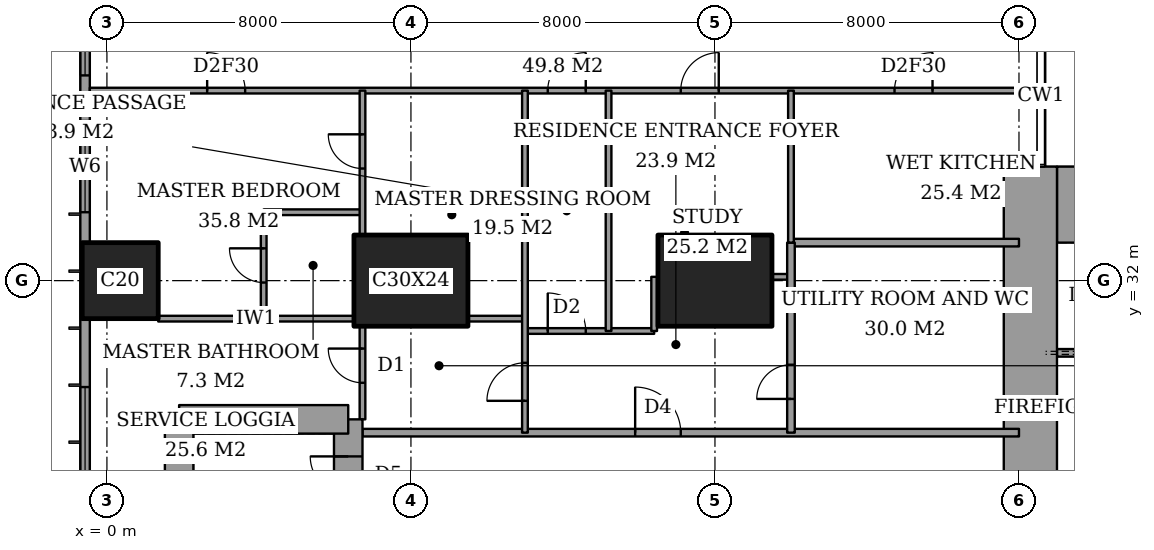
"""IFC4 building model, lengths in metres.
Left out: names, types, materials, properties, quantities, classifications, styles, units other than length and angle.
Written with IfcOpenShell. Run it as: python <this file> out.ifc"""

import sys

from ifc_helpers import new_model, si_unit, direction, frame, frame_2d, origin, origin_2d, place, context, subcontext, project, spatial, rectangle, extrude, element, fill, save


model = new_model("IFC4")
c1 = context("Model", 3, precision=1e-05, world=origin(), true_north=direction((0.0, 1.0)))
c2 = subcontext(c1, "Body", "Model", "MODEL_VIEW")
j1 = project(units=[si_unit("LENGTHUNIT", "METRE"), si_unit("PLANEANGLEUNIT", "RADIAN")], contexts=[c1])
p1 = place(None, origin())
s1 = spatial("IfcSite", under=j1, at=p1, CompositionType="ELEMENT")
p2 = place(p1, origin())
s2 = spatial("IfcBuilding", under=s1, at=p2, CompositionType="ELEMENT")
p3 = place(p2, frame((0.0, 0.0, 33.2)))
s3 = spatial("IfcBuildingStorey", under=s2, at=p3, CompositionType="ELEMENT", Elevation=33.2)
p4 = place(p3, frame((0.35, 32.0, 0.0), z_axis=(0.0, 0.0, 1.0), x_axis=(1.0, 0.0, 0.0)))
e1 = element("IfcColumn", 1, at=p4, inside=s3, PredefinedType="COLUMN", context=c2, shape_type="SweptSolid", body=[
    extrude(rectangle(XDim=2.0, YDim=2.0, at=origin_2d()), origin(), (0.0, 0.0, 1.0), 3.6),
])
for number, where, z_axis, x_axis in (
    (2, (8.0, 32.0, 0.0), (0.0, 0.0, 1.0), (1.0, 0.0, 0.0)),
    (3, (16.0, 32.0, 0.0), (0.0, 0.0, 1.0), (1.0, 0.0, 0.0)),
):
    element("IfcColumn", number, at=place(p3, frame(where, z_axis=z_axis, x_axis=x_axis)), inside=s3, PredefinedType="COLUMN", context=c2, shape_type="SweptSolid", body=[
        extrude(rectangle(XDim=3.0, YDim=2.4, at=origin_2d()), origin(), (0.0, 0.0, 1.0), 3.6),
    ])
p5 = place(p3, frame((25.0, 34.0, 0.0), z_axis=(0.0, 0.0, 1.0), x_axis=(1.0, 0.0, 0.0)))
e4 = element("IfcWall", 4, at=p5, inside=s3, PredefinedType="SHEAR", context=c2, shape_type="SweptSolid", body=[
    extrude(rectangle(XDim=3.15, YDim=2.0, at=frame_2d((1.575, 0.0))), origin(), (0.0, 0.0, 1.0), 3.6),
])
p6 = place(p3, frame((24.3, 23.15, 0.0), z_axis=(0.0, 0.0, 1.0), x_axis=(0.0, 1.0, 0.0)))
e5 = element("IfcWall", 5, at=p6, inside=s3, PredefinedType="SHEAR", context=c2, shape_type="SweptSolid", body=[
    extrude(rectangle(XDim=11.85, YDim=1.4, at=frame_2d((5.925, 0.0))), origin(), (0.0, 0.0, 1.0), 3.6),
])
p7 = place(p6, frame((0.75, 0.0, 0.0)))
e6 = element("IfcOpeningElement", 6, at=p7, cuts=e5, PredefinedType="OPENING", context=c2, shape_type="SweptSolid", body=[
    extrude(rectangle(XDim=1.8, YDim=2.4, at=frame_2d((0.9, 1.2))), frame((0.0, 0.71, 0.0), z_axis=(0.0, -1.0, 0.0), x_axis=(1.0, 0.0, 0.0)), (0.0, 0.0, 1.0), 1.42),
])
p8 = place(p3, frame((6.35, 19.65, 0.0), z_axis=(0.0, 0.0, 1.0), x_axis=(0.0, 1.0, 0.0)))
e7 = element("IfcWall", 7, at=p8, inside=s3, PredefinedType="SHEAR", context=c2, shape_type="SweptSolid", body=[
    extrude(rectangle(XDim=8.7, YDim=0.75, at=frame_2d((4.35, 0.0))), origin(), (0.0, 0.0, 1.0), 3.6),
])
p9 = place(p8, frame((6.725, 0.0, 0.0)))
e8 = element("IfcOpeningElement", 8, at=p9, cuts=e7, PredefinedType="OPENING", context=c2, shape_type="SweptSolid", body=[
    extrude(rectangle(XDim=1.0, YDim=2.1, at=frame_2d((0.5, 1.05))), frame((0.0, 0.385, 0.0), z_axis=(0.0, -1.0, 0.0), x_axis=(1.0, 0.0, 0.0)), (0.0, 0.0, 1.0), 0.77),
])
p10 = place(p3, frame((6.35, 28.35, 0.0), z_axis=(0.0, 0.0, 1.0), x_axis=(-1.0, 0.0, 0.0)))
e9 = element("IfcWall", 9, at=p10, inside=s3, PredefinedType="SHEAR", context=c2, shape_type="SweptSolid", body=[
    extrude(rectangle(XDim=4.45, YDim=0.75, at=frame_2d((2.225, 0.0))), origin(), (0.0, 0.0, 1.0), 3.6),
])
p11 = place(p3, frame((1.9, 28.35, 0.0), z_axis=(0.0, 0.0, 1.0), x_axis=(0.0, -1.0, 0.0)))
e10 = element("IfcWall", 10, at=p11, inside=s3, PredefinedType="SHEAR", context=c2, shape_type="SweptSolid", body=[
    extrude(rectangle(XDim=8.7, YDim=0.75, at=frame_2d((4.35, 0.0))), origin(), (0.0, 0.0, 1.0), 3.6),
])
p12 = place(p3, frame((-0.575, 44.825, 0.0), z_axis=(0.0, 0.0, 1.0), x_axis=(0.0, -1.0, 0.0)))
e11 = element("IfcWall", 11, at=p12, inside=s3, PredefinedType="SOLIDWALL", context=c2, shape_type="SweptSolid", body=[
    extrude(rectangle(XDim=41.65, YDim=0.25, at=frame_2d((20.825, 0.0))), origin(), (0.0, 0.0, 1.0), 3.6),
])
p13 = place(p12, frame((0.775, 0.0, 0.6)))
e12 = element("IfcOpeningElement", 12, at=p13, cuts=e11, PredefinedType="OPENING", context=c2, shape_type="SweptSolid", body=[
    extrude(rectangle(XDim=2.4, YDim=2.0, at=frame_2d((1.2, 1.0))), frame((0.0, 0.135, 0.0), z_axis=(0.0, -1.0, 0.0), x_axis=(1.0, 0.0, 0.0)), (0.0, 0.0, 1.0), 0.27),
])
p14 = place(p12, frame((6.225, 0.0, 0.6)))
e13 = element("IfcOpeningElement", 13, at=p14, cuts=e11, PredefinedType="OPENING", context=c2, shape_type="SweptSolid", body=[
    extrude(rectangle(XDim=1.2, YDim=2.0, at=frame_2d((0.6, 1.0))), frame((0.0, 0.135, 0.0), z_axis=(0.0, -1.0, 0.0), x_axis=(1.0, 0.0, 0.0)), (0.0, 0.0, 1.0), 0.27),
])
p15 = place(p12, frame((8.625, 0.0, 0.6)))
e14 = element("IfcOpeningElement", 14, at=p15, cuts=e11, PredefinedType="OPENING", context=c2, shape_type="SweptSolid", body=[
    extrude(rectangle(XDim=2.4, YDim=2.0, at=frame_2d((1.2, 1.0))), frame((0.0, 0.135, 0.0), z_axis=(0.0, -1.0, 0.0), x_axis=(1.0, 0.0, 0.0)), (0.0, 0.0, 1.0), 0.27),
])
p16 = place(p12, frame((15.625, 0.0, 0.6)))
e15 = element("IfcOpeningElement", 15, at=p16, cuts=e11, PredefinedType="OPENING", context=c2, shape_type="SweptSolid", body=[
    extrude(rectangle(XDim=2.4, YDim=2.0, at=frame_2d((1.2, 1.0))), frame((0.0, 0.135, 0.0), z_axis=(0.0, -1.0, 0.0), x_axis=(1.0, 0.0, 0.0)), (0.0, 0.0, 1.0), 0.27),
])
p17 = place(p12, frame((23.625, 0.0, 0.6)))
e16 = element("IfcOpeningElement", 16, at=p17, cuts=e11, PredefinedType="OPENING", context=c2, shape_type="SweptSolid", body=[
    extrude(rectangle(XDim=2.4, YDim=2.0, at=frame_2d((1.2, 1.0))), frame((0.0, 0.135, 0.0), z_axis=(0.0, -1.0, 0.0), x_axis=(1.0, 0.0, 0.0)), (0.0, 0.0, 1.0), 0.27),
])
p18 = place(p12, frame((30.825, 0.0, 0.6)))
e17 = element("IfcOpeningElement", 17, at=p18, cuts=e11, PredefinedType="OPENING", context=c2, shape_type="SweptSolid", body=[
    extrude(rectangle(XDim=2.4, YDim=2.0, at=frame_2d((1.2, 1.0))), frame((0.0, 0.135, 0.0), z_axis=(0.0, -1.0, 0.0), x_axis=(1.0, 0.0, 0.0)), (0.0, 0.0, 1.0), 0.27),
])
p19 = place(p12, frame((34.5, 0.0, 0.6)))
e18 = element("IfcOpeningElement", 18, at=p19, cuts=e11, PredefinedType="OPENING", context=c2, shape_type="SweptSolid", body=[
    extrude(rectangle(XDim=1.2, YDim=2.0, at=frame_2d((0.6, 1.0))), frame((0.0, 0.135, 0.0), z_axis=(0.0, -1.0, 0.0), x_axis=(1.0, 0.0, 0.0)), (0.0, 0.0, 1.0), 0.27),
])
p20 = place(p12, frame((38.475, 0.0, 0.6)))
e19 = element("IfcOpeningElement", 19, at=p20, cuts=e11, PredefinedType="OPENING", context=c2, shape_type="SweptSolid", body=[
    extrude(rectangle(XDim=2.4, YDim=2.0, at=frame_2d((1.2, 1.0))), frame((0.0, 0.135, 0.0), z_axis=(0.0, -1.0, 0.0), x_axis=(1.0, 0.0, 0.0)), (0.0, 0.0, 1.0), 0.27),
])
p21 = place(p3, frame((6.725, 28.0, 0.0), z_axis=(0.0, 0.0, 1.0), x_axis=(1.0, 0.0, 0.0)))
e20 = element("IfcWall", 20, at=p21, inside=s3, PredefinedType="PARTITIONING", context=c2, shape_type="SweptSolid", body=[
    extrude(rectangle(XDim=17.275, YDim=0.2, at=frame_2d((8.637, 0.0))), origin(), (0.0, 0.0, 1.0), 3.35),
])
p22 = place(p21, frame((7.175, 0.0, 0.0)))
e21 = element("IfcOpeningElement", 21, at=p22, cuts=e20, PredefinedType="OPENING", context=c2, shape_type="SweptSolid", body=[
    extrude(rectangle(XDim=1.2, YDim=2.4, at=frame_2d((0.6, 1.2))), frame((0.0, 0.11, 0.0), z_axis=(0.0, -1.0, 0.0), x_axis=(1.0, 0.0, 0.0)), (0.0, 0.0, 1.0), 0.22),
])
p23 = place(p3, frame((11.0, 30.675, 0.0), z_axis=(0.0, 0.0, 1.0), x_axis=(1.0, 0.0, 0.0)))
e22 = element("IfcWall", 22, at=p23, inside=s3, PredefinedType="PARTITIONING", context=c2, shape_type="SweptSolid", body=[
    extrude(rectangle(XDim=3.4, YDim=0.15, at=frame_2d((1.7, 0.0))), origin(), (0.0, 0.0, 1.0), 3.35),
])
p24 = place(p23, frame((0.6, 0.0, 0.0)))
e23 = element("IfcOpeningElement", 23, at=p24, cuts=e22, PredefinedType="OPENING", context=c2, shape_type="SweptSolid", body=[
    extrude(rectangle(XDim=1.0, YDim=2.1, at=frame_2d((0.5, 1.05))), frame((0.0, 0.085, 0.0), z_axis=(0.0, -1.0, 0.0), x_axis=(1.0, 0.0, 0.0)), (0.0, 0.0, 1.0), 0.17),
])
p25 = place(p3, frame((1.35, 31.0, 0.0), z_axis=(0.0, 0.0, 1.0), x_axis=(1.0, 0.0, 0.0)))
e24 = element("IfcWall", 24, at=p25, inside=s3, PredefinedType="PARTITIONING", context=c2, shape_type="SweptSolid", body=[
    extrude(rectangle(XDim=5.15, YDim=0.15, at=frame_2d((2.575, 0.0))), origin(), (0.0, 0.0, 1.0), 3.35),
])
p26 = place(p3, frame((9.5, 31.0, 0.0), z_axis=(0.0, 0.0, 1.0), x_axis=(1.0, 0.0, 0.0)))
e25 = element("IfcWall", 25, at=p26, inside=s3, PredefinedType="PARTITIONING", context=c2, shape_type="SweptSolid", body=[
    extrude(rectangle(XDim=1.5, YDim=0.15, at=frame_2d((0.75, 0.0))), origin(), (0.0, 0.0, 1.0), 3.35),
])
p27 = place(p3, frame((17.5, 32.1, 0.0), z_axis=(0.0, 0.0, 1.0), x_axis=(1.0, 0.0, 0.0)))
e26 = element("IfcWall", 26, at=p27, inside=s3, PredefinedType="PARTITIONING", context=c2, shape_type="SweptSolid", body=[
    extrude(rectangle(XDim=0.5, YDim=0.15, at=frame_2d((0.25, 0.0))), origin(), (0.0, 0.0, 1.0), 2.634),
])
p28 = place(p3, frame((18.0, 33.0, 0.0), z_axis=(0.0, 0.0, 1.0), x_axis=(1.0, 0.0, 0.0)))
e27 = element("IfcWall", 27, at=p28, inside=s3, PredefinedType="PARTITIONING", context=c2, shape_type="SweptSolid", body=[
    extrude(rectangle(XDim=6.0, YDim=0.2, at=frame_2d((3.0, 0.0))), origin(), (0.0, 0.0, 1.0), 3.35),
])
p29 = place(p3, frame((4.125, 33.8, 0.0), z_axis=(0.0, 0.0, 1.0), x_axis=(1.0, 0.0, 0.0)))
e28 = element("IfcWall", 28, at=p29, inside=s3, PredefinedType="PARTITIONING", context=c2, shape_type="SweptSolid", body=[
    extrude(rectangle(XDim=2.6, YDim=0.15, at=frame_2d((1.3, 0.0))), origin(), (0.0, 0.0, 1.0), 3.35),
])
p30 = place(p3, frame((-0.45, 37.0, 0.0), z_axis=(0.0, 0.0, 1.0), x_axis=(1.0, 0.0, 0.0)))
e29 = element("IfcWall", 29, at=p30, inside=s3, PredefinedType="PARTITIONING", context=c2, shape_type="SweptSolid", body=[
    extrude(rectangle(XDim=25.011, YDim=0.15, at=frame_2d((12.505, 0.0))), origin(), (0.0, 0.0, 1.0), 3.35),
])
p31 = place(p30, frame((12.05, 0.0, 0.0)))
e30 = element("IfcOpeningElement", 30, at=p31, cuts=e29, PredefinedType="OPENING", context=c2, shape_type="SweptSolid", body=[
    extrude(rectangle(XDim=1.0, YDim=2.1, at=frame_2d((0.5, 1.05))), frame((0.0, 0.085, 0.0), z_axis=(0.0, -1.0, 0.0), x_axis=(1.0, 0.0, 0.0)), (0.0, 0.0, 1.0), 0.17),
])
p32 = place(p30, frame((3.087, 0.0, 0.0)))
e31 = element("IfcOpeningElement", 31, at=p32, cuts=e29, PredefinedType="OPENING", context=c2, shape_type="SweptSolid", body=[
    extrude(rectangle(XDim=1.0, YDim=2.1, at=frame_2d((0.5, 1.05))), frame((0.0, 0.085, 0.0), z_axis=(0.0, -1.0, 0.0), x_axis=(1.0, 0.0, 0.0)), (0.0, 0.0, 1.0), 0.17),
])
p33 = place(p30, frame((15.55, 0.0, 0.0)))
e32 = element("IfcOpeningElement", 32, at=p33, cuts=e29, PredefinedType="OPENING", context=c2, shape_type="SweptSolid", body=[
    extrude(rectangle(XDim=1.0, YDim=2.1, at=frame_2d((0.5, 1.05))), frame((0.0, 0.085, 0.0), z_axis=(0.0, -1.0, 0.0), x_axis=(1.0, 0.0, 0.0)), (0.0, 0.0, 1.0), 0.17),
])
p34 = place(p30, frame((21.175, 0.0, 0.0)))
e33 = element("IfcOpeningElement", 33, at=p34, cuts=e29, PredefinedType="OPENING", context=c2, shape_type="SweptSolid", body=[
    extrude(rectangle(XDim=1.0, YDim=2.1, at=frame_2d((0.5, 1.05))), frame((0.0, 0.085, 0.0), z_axis=(0.0, -1.0, 0.0), x_axis=(1.0, 0.0, 0.0)), (0.0, 0.0, 1.0), 0.17),
])
p35 = place(p3, frame((4.125, 31.0, 0.0), z_axis=(0.0, 0.0, 1.0), x_axis=(0.0, 1.0, 0.0)))
e34 = element("IfcWall", 34, at=p35, inside=s3, PredefinedType="PARTITIONING", context=c2, shape_type="SweptSolid", body=[
    extrude(rectangle(XDim=2.8, YDim=0.15, at=frame_2d((1.4, 0.0))), origin(), (0.0, 0.0, 1.0), 3.35),
])
p36 = place(p35, frame((0.95, 0.0, 0.0)))
e35 = element("IfcOpeningElement", 35, at=p36, cuts=e34, PredefinedType="OPENING", context=c2, shape_type="SweptSolid", body=[
    extrude(rectangle(XDim=0.9, YDim=2.1, at=frame_2d((0.45, 1.05))), frame((0.0, 0.085, 0.0), z_axis=(0.0, -1.0, 0.0), x_axis=(1.0, 0.0, 0.0)), (0.0, 0.0, 1.0), 0.17),
])
p37 = place(p3, frame((6.725, 28.35, 0.0), z_axis=(0.0, 0.0, 1.0), x_axis=(0.0, 1.0, 0.0)))
e36 = element("IfcWall", 36, at=p37, inside=s3, PredefinedType="PARTITIONING", context=c2, shape_type="SweptSolid", body=[
    extrude(rectangle(XDim=2.45, YDim=0.15, at=frame_2d((1.225, 0.0))), origin(), (0.0, 0.0, 1.0), 3.35),
])
p38 = place(p37, frame((0.962, 0.0, 0.0)))
e37 = element("IfcOpeningElement", 37, at=p38, cuts=e36, PredefinedType="OPENING", context=c2, shape_type="SweptSolid", body=[
    extrude(rectangle(XDim=0.9, YDim=2.1, at=frame_2d((0.45, 1.05))), frame((0.0, 0.085, 0.0), z_axis=(0.0, -1.0, 0.0), x_axis=(1.0, 0.0, 0.0)), (0.0, 0.0, 1.0), 0.17),
])
p39 = place(p3, frame((6.725, 33.2, 0.0), z_axis=(0.0, 0.0, 1.0), x_axis=(0.0, 1.0, 0.0)))
e38 = element("IfcWall", 38, at=p39, inside=s3, PredefinedType="PARTITIONING", context=c2, shape_type="SweptSolid", body=[
    extrude(rectangle(XDim=3.8, YDim=0.15, at=frame_2d((1.9, 0.0))), origin(), (0.0, 0.0, 1.0), 3.35),
])
p40 = place(p39, frame((1.75, 0.0, 0.0)))
e39 = element("IfcOpeningElement", 39, at=p40, cuts=e38, PredefinedType="OPENING", context=c2, shape_type="SweptSolid", body=[
    extrude(rectangle(XDim=0.9, YDim=2.1, at=frame_2d((0.45, 1.05))), frame((0.0, 0.085, 0.0), z_axis=(0.0, -1.0, 0.0), x_axis=(1.0, 0.0, 0.0)), (0.0, 0.0, 1.0), 0.17),
])
p41 = place(p3, frame((11.0, 28.0, 0.0), z_axis=(0.0, 0.0, 1.0), x_axis=(0.0, 1.0, 0.0)))
e40 = element("IfcWall", 40, at=p41, inside=s3, PredefinedType="PARTITIONING", context=c2, shape_type="SweptSolid", body=[
    extrude(rectangle(XDim=9.0, YDim=0.15, at=frame_2d((4.5, 0.0))), origin(), (0.0, 0.0, 1.0), 3.35),
])
p42 = place(p41, frame((0.837, 0.0, 0.0)))
e41 = element("IfcOpeningElement", 41, at=p42, cuts=e40, PredefinedType="OPENING", context=c2, shape_type="SweptSolid", body=[
    extrude(rectangle(XDim=1.0, YDim=2.1, at=frame_2d((0.5, 1.05))), frame((0.0, 0.085, 0.0), z_axis=(0.0, -1.0, 0.0), x_axis=(1.0, 0.0, 0.0)), (0.0, 0.0, 1.0), 0.17),
])
p43 = place(p3, frame((13.2, 30.675, 0.0), z_axis=(0.0, 0.0, 1.0), x_axis=(0.0, 1.0, 0.0)))
e42 = element("IfcWall", 42, at=p43, inside=s3, PredefinedType="PARTITIONING", context=c2, shape_type="SweptSolid", body=[
    extrude(rectangle(XDim=6.325, YDim=0.15, at=frame_2d((3.163, 0.0))), origin(), (0.0, 0.0, 1.0), 3.35),
])
p44 = place(p3, frame((14.4, 30.675, 0.0), z_axis=(0.0, 0.0, 1.0), x_axis=(0.0, 1.0, 0.0)))
e43 = element("IfcWall", 43, at=p44, inside=s3, PredefinedType="PARTITIONING", context=c2, shape_type="SweptSolid", body=[
    extrude(rectangle(XDim=1.425, YDim=0.15, at=frame_2d((0.712, 0.0))), origin(), (0.0, 0.0, 1.0), 3.35),
])
p45 = place(p3, frame((18.0, 28.0, 0.0), z_axis=(0.0, 0.0, 1.0), x_axis=(0.0, 1.0, 0.0)))
e44 = element("IfcWall", 44, at=p45, inside=s3, PredefinedType="PARTITIONING", context=c2, shape_type="SweptSolid", body=[
    extrude(rectangle(XDim=5.0, YDim=0.2, at=frame_2d((2.5, 0.0))), origin(), (0.0, 0.0, 1.0), 3.35),
])
p46 = place(p45, frame((0.887, 0.0, 0.0)))
e45 = element("IfcOpeningElement", 45, at=p46, cuts=e44, PredefinedType="OPENING", context=c2, shape_type="SweptSolid", body=[
    extrude(rectangle(XDim=0.9, YDim=2.1, at=frame_2d((0.45, 1.05))), frame((0.0, 0.11, 0.0), z_axis=(0.0, -1.0, 0.0), x_axis=(1.0, 0.0, 0.0)), (0.0, 0.0, 1.0), 0.22),
])
p47 = place(p3, frame((18.0, 33.0, 0.0), z_axis=(0.0, 0.0, 1.0), x_axis=(0.0, 1.0, 0.0)))
e46 = element("IfcWall", 46, at=p47, inside=s3, PredefinedType="PARTITIONING", context=c2, shape_type="SweptSolid", body=[
    extrude(rectangle(XDim=4.0, YDim=0.15, at=frame_2d((2.0, 0.0))), origin(), (0.0, 0.0, 1.0), 3.35),
])
p48 = place(p3, frame((25.0, 30.1, 0.0), z_axis=(0.0, 0.0, 1.0), x_axis=(1.0, 0.0, 0.0)))
e47 = element("IfcWall", 47, at=p48, inside=s3, PredefinedType="PARTITIONING", context=c2, shape_type="SweptSolid", body=[
    extrude(rectangle(XDim=12.7, YDim=0.2, at=frame_2d((6.35, 0.0))), origin(), (0.0, 0.0, 1.0), 3.6),
])
p49 = place(p48, frame((0.9, 0.0, 0.0)))
e48 = element("IfcOpeningElement", 48, at=p49, cuts=e47, PredefinedType="OPENING", context=c2, shape_type="SweptSolid", body=[
    extrude(rectangle(XDim=1.2, YDim=2.1, at=frame_2d((0.6, 1.05))), frame((0.0, 0.11, 0.0), z_axis=(0.0, -1.0, 0.0), x_axis=(1.0, 0.0, 0.0)), (0.0, 0.0, 1.0), 0.22),
])
p50 = place(p14, origin())
e49 = element("IfcWindow", 49, at=p50, inside=s3, PartitioningType="SINGLE_PANEL", PredefinedType="WINDOW", context=c2, shape_type="SweptSolid", body=[
    extrude(rectangle(XDim=1.2, YDim=2.0, at=frame_2d((0.6, 1.0))), frame((0.0, 0.03, 0.0), z_axis=(0.0, -1.0, 0.0), x_axis=(1.0, 0.0, 0.0)), (0.0, 0.0, 1.0), 0.06),
])
fill(e13, e49)
p51 = place(p15, origin())
e50 = element("IfcWindow", 50, at=p51, inside=s3, PartitioningType="SINGLE_PANEL", PredefinedType="WINDOW", context=c2, shape_type="SweptSolid", body=[
    extrude(rectangle(XDim=2.4, YDim=2.0, at=frame_2d((1.2, 1.0))), frame((0.0, 0.03, 0.0), z_axis=(0.0, -1.0, 0.0), x_axis=(1.0, 0.0, 0.0)), (0.0, 0.0, 1.0), 0.06),
])
fill(e14, e50)
p52 = place(p16, origin())
e51 = element("IfcWindow", 51, at=p52, inside=s3, PartitioningType="SINGLE_PANEL", PredefinedType="WINDOW", context=c2, shape_type="SweptSolid", body=[
    extrude(rectangle(XDim=2.4, YDim=2.0, at=frame_2d((1.2, 1.0))), frame((0.0, 0.03, 0.0), z_axis=(0.0, -1.0, 0.0), x_axis=(1.0, 0.0, 0.0)), (0.0, 0.0, 1.0), 0.06),
])
fill(e15, e51)
p53 = place(p31, origin())
e52 = element("IfcDoor", 52, at=p53, inside=s3, OperationType="SINGLE_SWING_LEFT", PredefinedType="DOOR", context=c2, shape_type="SweptSolid", body=[
    extrude(rectangle(XDim=1.0, YDim=2.1, at=frame_2d((0.5, 1.05))), frame((0.0, 0.025, 0.0), z_axis=(0.0, -1.0, 0.0), x_axis=(1.0, 0.0, 0.0)), (0.0, 0.0, 1.0), 0.05),
])
fill(e30, e52)
p54 = place(p36, origin())
e53 = element("IfcDoor", 53, at=p54, inside=s3, OperationType="SINGLE_SWING_LEFT", PredefinedType="DOOR", context=c2, shape_type="SweptSolid", body=[
    extrude(rectangle(XDim=0.9, YDim=2.1, at=frame_2d((0.45, 1.05))), frame((0.0, 0.025, 0.0), z_axis=(0.0, -1.0, 0.0), x_axis=(1.0, 0.0, 0.0)), (0.0, 0.0, 1.0), 0.05),
])
fill(e35, e53)
p55 = place(p32, origin())
e54 = element("IfcDoor", 54, at=p55, inside=s3, OperationType="SINGLE_SWING_RIGHT", PredefinedType="DOOR", context=c2, shape_type="SweptSolid", body=[
    extrude(rectangle(XDim=1.0, YDim=2.1, at=frame_2d((0.5, 1.05))), frame((0.0, 0.025, 0.0), z_axis=(0.0, -1.0, 0.0), x_axis=(1.0, 0.0, 0.0)), (0.0, 0.0, 1.0), 0.05),
])
fill(e31, e54)
p56 = place(p38, origin())
e55 = element("IfcDoor", 55, at=p56, inside=s3, OperationType="SINGLE_SWING_LEFT", PredefinedType="DOOR", context=c2, shape_type="SweptSolid", body=[
    extrude(rectangle(XDim=0.9, YDim=2.1, at=frame_2d((0.45, 1.05))), frame((0.0, 0.025, 0.0), z_axis=(0.0, -1.0, 0.0), x_axis=(1.0, 0.0, 0.0)), (0.0, 0.0, 1.0), 0.05),
])
fill(e37, e55)
p57 = place(p40, origin())
e56 = element("IfcDoor", 56, at=p57, inside=s3, OperationType="SINGLE_SWING_LEFT", PredefinedType="DOOR", context=c2, shape_type="SweptSolid", body=[
    extrude(rectangle(XDim=0.9, YDim=2.1, at=frame_2d((0.45, 1.05))), frame((0.0, 0.025, 0.0), z_axis=(0.0, -1.0, 0.0), x_axis=(1.0, 0.0, 0.0)), (0.0, 0.0, 1.0), 0.05),
])
fill(e39, e56)
p58 = place(p42, origin())
e57 = element("IfcDoor", 57, at=p58, inside=s3, OperationType="SINGLE_SWING_RIGHT", PredefinedType="DOOR", context=c2, shape_type="SweptSolid", body=[
    extrude(rectangle(XDim=1.0, YDim=2.1, at=frame_2d((0.5, 1.05))), frame((0.0, 0.025, 0.0), z_axis=(0.0, -1.0, 0.0), x_axis=(1.0, 0.0, 0.0)), (0.0, 0.0, 1.0), 0.05),
])
fill(e41, e57)
p59 = place(p22, origin())
e58 = element("IfcDoor", 58, at=p59, inside=s3, OperationType="SINGLE_SWING_RIGHT", PredefinedType="DOOR", context=c2, shape_type="SweptSolid", body=[
    extrude(rectangle(XDim=1.2, YDim=2.4, at=frame_2d((0.6, 1.2))), frame((0.0, 0.025, 0.0), z_axis=(0.0, -1.0, 0.0), x_axis=(1.0, 0.0, 0.0)), (0.0, 0.0, 1.0), 0.05),
])
fill(e21, e58)
p60 = place(p24, origin())
e59 = element("IfcDoor", 59, at=p60, inside=s3, OperationType="SINGLE_SWING_RIGHT", PredefinedType="DOOR", context=c2, shape_type="SweptSolid", body=[
    extrude(rectangle(XDim=1.0, YDim=2.1, at=frame_2d((0.5, 1.05))), frame((0.0, 0.025, 0.0), z_axis=(0.0, -1.0, 0.0), x_axis=(1.0, 0.0, 0.0)), (0.0, 0.0, 1.0), 0.05),
])
fill(e23, e59)
p61 = place(p33, origin())
e60 = element("IfcDoor", 60, at=p61, inside=s3, OperationType="SINGLE_SWING_LEFT", PredefinedType="DOOR", context=c2, shape_type="SweptSolid", body=[
    extrude(rectangle(XDim=1.0, YDim=2.1, at=frame_2d((0.5, 1.05))), frame((0.0, 0.025, 0.0), z_axis=(0.0, -1.0, 0.0), x_axis=(1.0, 0.0, 0.0)), (0.0, 0.0, 1.0), 0.05),
])
fill(e32, e60)
p62 = place(p34, origin())
e61 = element("IfcDoor", 61, at=p62, inside=s3, OperationType="SINGLE_SWING_LEFT", PredefinedType="DOOR", context=c2, shape_type="SweptSolid", body=[
    extrude(rectangle(XDim=1.0, YDim=2.1, at=frame_2d((0.5, 1.05))), frame((0.0, 0.025, 0.0), z_axis=(0.0, -1.0, 0.0), x_axis=(1.0, 0.0, 0.0)), (0.0, 0.0, 1.0), 0.05),
])
fill(e33, e61)
p63 = place(p46, origin())
e62 = element("IfcDoor", 62, at=p63, inside=s3, OperationType="SINGLE_SWING_RIGHT", PredefinedType="DOOR", context=c2, shape_type="SweptSolid", body=[
    extrude(rectangle(XDim=0.9, YDim=2.1, at=frame_2d((0.45, 1.05))), frame((0.0, 0.025, 0.0), z_axis=(0.0, -1.0, 0.0), x_axis=(1.0, 0.0, 0.0)), (0.0, 0.0, 1.0), 0.05),
])
fill(e45, e62)
p64 = place(p9, origin())
e63 = element("IfcDoor", 63, at=p64, inside=s3, OperationType="SINGLE_SWING_LEFT", PredefinedType="DOOR", context=c2, shape_type="SweptSolid", body=[
    extrude(rectangle(XDim=1.0, YDim=2.1, at=frame_2d((0.5, 1.05))), frame((0.0, 0.025, 0.0), z_axis=(0.0, -1.0, 0.0), x_axis=(1.0, 0.0, 0.0)), (0.0, 0.0, 1.0), 0.05),
])
fill(e8, e63)
save(model, sys.argv[1])
